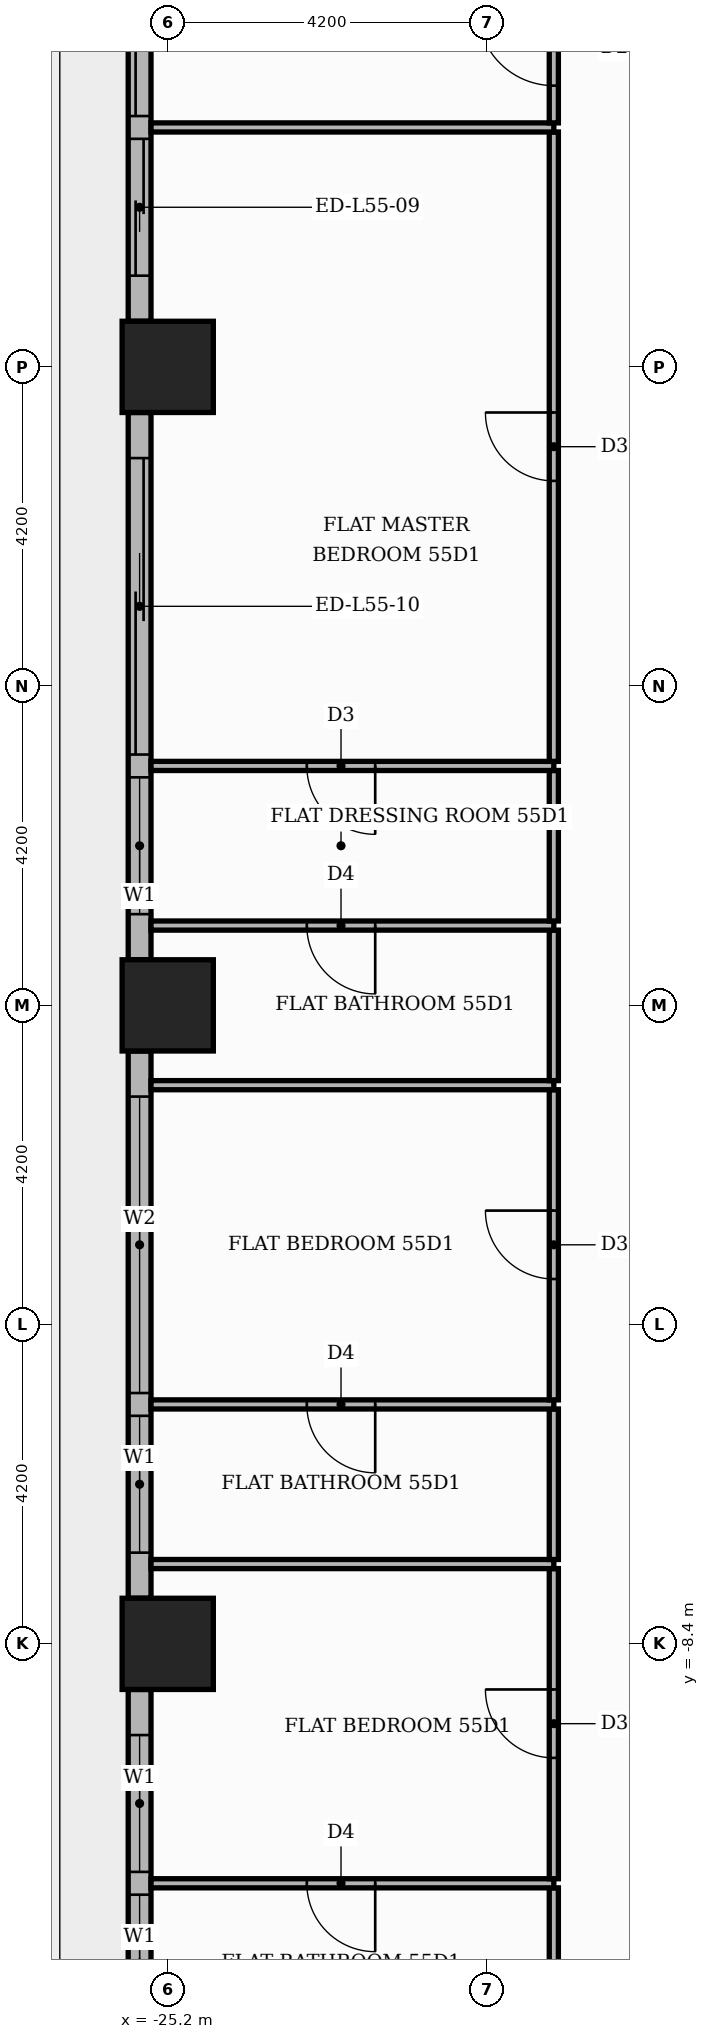
"""IFC4 building model, lengths in metres.
Left out: names, types, materials, properties, quantities, classifications, styles, units other than length and angle.
Written with IfcOpenShell. Run it as: python <this file> out.ifc"""

import sys

from ifc_helpers import new_model, si_unit, direction, frame, frame_2d, origin, origin_2d, place, context, subcontext, project, spatial, rectangle, extrude, element, fill, save


model = new_model("IFC4")
c1 = context("Model", 3, precision=1e-05, world=origin(), true_north=direction((0.0, 1.0)))
c2 = subcontext(c1, "Body", "Model", "MODEL_VIEW")
j1 = project(units=[si_unit("LENGTHUNIT", "METRE"), si_unit("PLANEANGLEUNIT", "RADIAN")], contexts=[c1])
p1 = place(None, origin())
s1 = spatial("IfcSite", under=j1, at=p1, CompositionType="ELEMENT")
p2 = place(p1, origin())
s2 = spatial("IfcBuilding", under=s1, at=p2, CompositionType="ELEMENT")
p3 = place(p2, frame((0.0, 0.0, 231.3)))
s3 = spatial("IfcBuildingStorey", under=s2, at=p3, CompositionType="ELEMENT", Elevation=231.3)
for number, where, z_axis, x_axis in (
    (1, (-25.2, 0.0, 0.0), (0.0, 0.0, 1.0), (1.0, 0.0, 0.0)),
    (2, (-25.2, -8.4, 0.0), (0.0, 0.0, 1.0), (1.0, 0.0, 0.0)),
    (3, (-25.2, 8.4, 0.0), (0.0, 0.0, 1.0), (1.0, 0.0, 0.0)),
):
    element("IfcColumn", number, at=place(p3, frame(where, z_axis=z_axis, x_axis=x_axis)), inside=s3, PredefinedType="COLUMN", context=c2, shape_type="SweptSolid", body=[
        extrude(rectangle(XDim=1.2, YDim=1.2, at=origin_2d()), origin(), (0.0, 0.0, 1.0), 3.9),
    ])
p4 = place(p3, frame((-25.57, 16.2, 0.0), z_axis=(0.0, 0.0, 1.0), x_axis=(0.0, -1.0, 0.0)))
e4 = element("IfcWall", 4, at=p4, inside=s3, PredefinedType="STANDARD", context=c2, shape_type="SweptSolid", body=[
    extrude(rectangle(XDim=7.2, YDim=0.3, at=frame_2d((3.6, 0.0))), origin(), (0.0, 0.0, 1.0), 3.4),
])
p5 = place(p4, frame((0.6, 0.0, 0.0)))
e5 = element("IfcOpeningElement", 5, at=p5, cuts=e4, PredefinedType="OPENING", context=c2, shape_type="SweptSolid", body=[
    extrude(rectangle(XDim=3.9, YDim=2.4, at=frame_2d((1.95, 1.2))), frame((0.0, 0.16, 0.0), z_axis=(0.0, -1.0, 0.0), x_axis=(1.0, 0.0, 0.0)), (0.0, 0.0, 1.0), 0.32),
])
p6 = place(p4, frame((4.8, 0.0, 0.0)))
e6 = element("IfcOpeningElement", 6, at=p6, cuts=e4, PredefinedType="OPENING", context=c2, shape_type="SweptSolid", body=[
    extrude(rectangle(XDim=1.8, YDim=2.4, at=frame_2d((0.9, 1.2))), frame((0.0, 0.16, 0.0), z_axis=(0.0, -1.0, 0.0), x_axis=(1.0, 0.0, 0.0)), (0.0, 0.0, 1.0), 0.32),
])
p7 = place(p3, frame((-25.57, 7.8, 0.0), z_axis=(0.0, 0.0, 1.0), x_axis=(0.0, -1.0, 0.0)))
e7 = element("IfcWall", 7, at=p7, inside=s3, PredefinedType="STANDARD", context=c2, shape_type="SweptSolid", body=[
    extrude(rectangle(XDim=7.2, YDim=0.3, at=frame_2d((3.6, 0.0))), origin(), (0.0, 0.0, 1.0), 3.4),
])
p8 = place(p7, frame((0.6, 0.0, 0.0)))
e8 = element("IfcOpeningElement", 8, at=p8, cuts=e7, PredefinedType="OPENING", context=c2, shape_type="SweptSolid", body=[
    extrude(rectangle(XDim=3.9, YDim=2.4, at=frame_2d((1.95, 1.2))), frame((0.0, 0.16, 0.0), z_axis=(0.0, -1.0, 0.0), x_axis=(1.0, 0.0, 0.0)), (0.0, 0.0, 1.0), 0.32),
])
p9 = place(p7, frame((4.8, 0.0, 0.9)))
e9 = element("IfcOpeningElement", 9, at=p9, cuts=e7, PredefinedType="OPENING", context=c2, shape_type="SweptSolid", body=[
    extrude(rectangle(XDim=1.8, YDim=2.1, at=frame_2d((0.9, 1.05))), frame((0.0, 0.16, 0.0), z_axis=(0.0, -1.0, 0.0), x_axis=(1.0, 0.0, 0.0)), (0.0, 0.0, 1.0), 0.32),
])
p10 = place(p3, frame((-25.57, -0.6, 0.0), z_axis=(0.0, 0.0, 1.0), x_axis=(0.0, -1.0, 0.0)))
e10 = element("IfcWall", 10, at=p10, inside=s3, PredefinedType="STANDARD", context=c2, shape_type="SweptSolid", body=[
    extrude(rectangle(XDim=7.2, YDim=0.3, at=frame_2d((3.6, 0.0))), origin(), (0.0, 0.0, 1.0), 3.4),
])
p11 = place(p10, frame((0.6, 0.0, 0.9)))
e11 = element("IfcOpeningElement", 11, at=p11, cuts=e10, PredefinedType="OPENING", context=c2, shape_type="SweptSolid", body=[
    extrude(rectangle(XDim=3.9, YDim=2.1, at=frame_2d((1.95, 1.05))), frame((0.0, 0.16, 0.0), z_axis=(0.0, -1.0, 0.0), x_axis=(1.0, 0.0, 0.0)), (0.0, 0.0, 1.0), 0.32),
])
p12 = place(p10, frame((4.8, 0.0, 0.9)))
e12 = element("IfcOpeningElement", 12, at=p12, cuts=e10, PredefinedType="OPENING", context=c2, shape_type="SweptSolid", body=[
    extrude(rectangle(XDim=1.8, YDim=2.1, at=frame_2d((0.9, 1.05))), frame((0.0, 0.16, 0.0), z_axis=(0.0, -1.0, 0.0), x_axis=(1.0, 0.0, 0.0)), (0.0, 0.0, 1.0), 0.32),
])
p13 = place(p3, frame((-25.57, -9.0, 0.0), z_axis=(0.0, 0.0, 1.0), x_axis=(0.0, -1.0, 0.0)))
e13 = element("IfcWall", 13, at=p13, inside=s3, PredefinedType="STANDARD", context=c2, shape_type="SweptSolid", body=[
    extrude(rectangle(XDim=7.2, YDim=0.3, at=frame_2d((3.6, 0.0))), origin(), (0.0, 0.0, 1.0), 3.4),
])
p14 = place(p13, frame((0.6, 0.0, 0.9)))
e14 = element("IfcOpeningElement", 14, at=p14, cuts=e13, PredefinedType="OPENING", context=c2, shape_type="SweptSolid", body=[
    extrude(rectangle(XDim=1.8, YDim=2.1, at=frame_2d((0.9, 1.05))), frame((0.0, 0.16, 0.0), z_axis=(0.0, -1.0, 0.0), x_axis=(1.0, 0.0, 0.0)), (0.0, 0.0, 1.0), 0.32),
])
p15 = place(p13, frame((2.7, 0.0, 0.9)))
e15 = element("IfcOpeningElement", 15, at=p15, cuts=e13, PredefinedType="OPENING", context=c2, shape_type="SweptSolid", body=[
    extrude(rectangle(XDim=1.8, YDim=2.1, at=frame_2d((0.9, 1.05))), frame((0.0, 0.16, 0.0), z_axis=(0.0, -1.0, 0.0), x_axis=(1.0, 0.0, 0.0)), (0.0, 0.0, 1.0), 0.32),
])
p16 = place(p13, frame((4.8, 0.0, 0.9)))
e16 = element("IfcOpeningElement", 16, at=p16, cuts=e13, PredefinedType="OPENING", context=c2, shape_type="SweptSolid", body=[
    extrude(rectangle(XDim=1.8, YDim=2.1, at=frame_2d((0.9, 1.05))), frame((0.0, 0.16, 0.0), z_axis=(0.0, -1.0, 0.0), x_axis=(1.0, 0.0, 0.0)), (0.0, 0.0, 1.0), 0.32),
])
p17 = place(p3, frame((-20.12, -13.55, 0.0), z_axis=(0.0, 0.0, 1.0), x_axis=(0.0, 1.0, 0.0)))
e17 = element("IfcWall", 17, at=p17, inside=s3, PredefinedType="PARTITIONING", context=c2, shape_type="SweptSolid", body=[
    extrude(rectangle(XDim=1.94, YDim=0.12, at=frame_2d((0.97, 0.0))), origin(), (0.0, 0.0, 1.0), 3.4),
])
p18 = place(p3, frame((-25.42, -11.55, 0.0), z_axis=(0.0, 0.0, 1.0), x_axis=(1.0, 0.0, 0.0)))
e18 = element("IfcWall", 18, at=p18, inside=s3, PredefinedType="PARTITIONING", context=c2, shape_type="SweptSolid", body=[
    extrude(rectangle(XDim=5.3, YDim=0.12, at=frame_2d((2.65, 0.0))), origin(), (0.0, 0.0, 1.0), 3.4),
])
p19 = place(p18, frame((2.05, 0.0, 0.0)))
e19 = element("IfcOpeningElement", 19, at=p19, cuts=e18, PredefinedType="OPENING", context=c2, shape_type="SweptSolid", body=[
    extrude(rectangle(XDim=0.9, YDim=2.1, at=frame_2d((0.45, 1.05))), frame((0.0, 0.07, 0.0), z_axis=(0.0, -1.0, 0.0), x_axis=(1.0, 0.0, 0.0)), (0.0, 0.0, 1.0), 0.14),
])
p20 = place(p3, frame((-20.12, -11.49, 0.0), z_axis=(0.0, 0.0, 1.0), x_axis=(0.0, 1.0, 0.0)))
e20 = element("IfcWall", 20, at=p20, inside=s3, PredefinedType="PARTITIONING", context=c2, shape_type="SweptSolid", body=[
    extrude(rectangle(XDim=4.08, YDim=0.12, at=frame_2d((2.04, 0.0))), origin(), (0.0, 0.0, 1.0), 3.4),
])
p21 = place(p20, frame((1.59, 0.0, 0.0)))
e21 = element("IfcOpeningElement", 21, at=p21, cuts=e20, PredefinedType="OPENING", context=c2, shape_type="SweptSolid", body=[
    extrude(rectangle(XDim=0.9, YDim=2.1, at=frame_2d((0.45, 1.05))), frame((0.0, 0.07, 0.0), z_axis=(0.0, -1.0, 0.0), x_axis=(1.0, 0.0, 0.0)), (0.0, 0.0, 1.0), 0.14),
])
p22 = place(p3, frame((-25.42, -7.35, 0.0), z_axis=(0.0, 0.0, 1.0), x_axis=(1.0, 0.0, 0.0)))
e22 = element("IfcWall", 22, at=p22, inside=s3, PredefinedType="PARTITIONING", context=c2, shape_type="SweptSolid", body=[
    extrude(rectangle(XDim=5.3, YDim=0.12, at=frame_2d((2.65, 0.0))), origin(), (0.0, 0.0, 1.0), 3.4),
])
p23 = place(p3, frame((-20.12, -7.29, 0.0), z_axis=(0.0, 0.0, 1.0), x_axis=(0.0, 1.0, 0.0)))
e23 = element("IfcWall", 23, at=p23, inside=s3, PredefinedType="PARTITIONING", context=c2, shape_type="SweptSolid", body=[
    extrude(rectangle(XDim=1.98, YDim=0.12, at=frame_2d((0.99, 0.0))), origin(), (0.0, 0.0, 1.0), 3.4),
])
p24 = place(p3, frame((-25.42, -5.25, 0.0), z_axis=(0.0, 0.0, 1.0), x_axis=(1.0, 0.0, 0.0)))
e24 = element("IfcWall", 24, at=p24, inside=s3, PredefinedType="PARTITIONING", context=c2, shape_type="SweptSolid", body=[
    extrude(rectangle(XDim=5.3, YDim=0.12, at=frame_2d((2.65, 0.0))), origin(), (0.0, 0.0, 1.0), 3.4),
])
p25 = place(p24, frame((2.05, 0.0, 0.0)))
e25 = element("IfcOpeningElement", 25, at=p25, cuts=e24, PredefinedType="OPENING", context=c2, shape_type="SweptSolid", body=[
    extrude(rectangle(XDim=0.9, YDim=2.1, at=frame_2d((0.45, 1.05))), frame((0.0, 0.07, 0.0), z_axis=(0.0, -1.0, 0.0), x_axis=(1.0, 0.0, 0.0)), (0.0, 0.0, 1.0), 0.14),
])
p26 = place(p3, frame((-20.12, -5.19, 0.0), z_axis=(0.0, 0.0, 1.0), x_axis=(0.0, 1.0, 0.0)))
e26 = element("IfcWall", 26, at=p26, inside=s3, PredefinedType="PARTITIONING", context=c2, shape_type="SweptSolid", body=[
    extrude(rectangle(XDim=4.08, YDim=0.12, at=frame_2d((2.04, 0.0))), origin(), (0.0, 0.0, 1.0), 3.4),
])
p27 = place(p26, frame((1.59, 0.0, 0.0)))
e27 = element("IfcOpeningElement", 27, at=p27, cuts=e26, PredefinedType="OPENING", context=c2, shape_type="SweptSolid", body=[
    extrude(rectangle(XDim=0.9, YDim=2.1, at=frame_2d((0.45, 1.05))), frame((0.0, 0.07, 0.0), z_axis=(0.0, -1.0, 0.0), x_axis=(1.0, 0.0, 0.0)), (0.0, 0.0, 1.0), 0.14),
])
p28 = place(p3, frame((-25.42, -1.05, 0.0), z_axis=(0.0, 0.0, 1.0), x_axis=(1.0, 0.0, 0.0)))
e28 = element("IfcWall", 28, at=p28, inside=s3, PredefinedType="PARTITIONING", context=c2, shape_type="SweptSolid", body=[
    extrude(rectangle(XDim=5.3, YDim=0.12, at=frame_2d((2.65, 0.0))), origin(), (0.0, 0.0, 1.0), 3.4),
])
p29 = place(p3, frame((-20.12, -0.99, 0.0), z_axis=(0.0, 0.0, 1.0), x_axis=(0.0, 1.0, 0.0)))
e29 = element("IfcWall", 29, at=p29, inside=s3, PredefinedType="PARTITIONING", context=c2, shape_type="SweptSolid", body=[
    extrude(rectangle(XDim=1.98, YDim=0.12, at=frame_2d((0.99, 0.0))), origin(), (0.0, 0.0, 1.0), 3.4),
])
p30 = place(p3, frame((-25.42, 1.05, 0.0), z_axis=(0.0, 0.0, 1.0), x_axis=(1.0, 0.0, 0.0)))
e30 = element("IfcWall", 30, at=p30, inside=s3, PredefinedType="PARTITIONING", context=c2, shape_type="SweptSolid", body=[
    extrude(rectangle(XDim=5.3, YDim=0.12, at=frame_2d((2.65, 0.0))), origin(), (0.0, 0.0, 1.0), 3.4),
])
p31 = place(p30, frame((2.05, 0.0, 0.0)))
e31 = element("IfcOpeningElement", 31, at=p31, cuts=e30, PredefinedType="OPENING", context=c2, shape_type="SweptSolid", body=[
    extrude(rectangle(XDim=0.9, YDim=2.1, at=frame_2d((0.45, 1.05))), frame((0.0, 0.07, 0.0), z_axis=(0.0, -1.0, 0.0), x_axis=(1.0, 0.0, 0.0)), (0.0, 0.0, 1.0), 0.14),
])
p32 = place(p3, frame((-20.12, 1.11, 0.0), z_axis=(0.0, 0.0, 1.0), x_axis=(0.0, 1.0, 0.0)))
e32 = element("IfcWall", 32, at=p32, inside=s3, PredefinedType="PARTITIONING", context=c2, shape_type="SweptSolid", body=[
    extrude(rectangle(XDim=1.98, YDim=0.12, at=frame_2d((0.99, 0.0))), origin(), (0.0, 0.0, 1.0), 3.4),
])
p33 = place(p3, frame((-25.42, 3.15, 0.0), z_axis=(0.0, 0.0, 1.0), x_axis=(1.0, 0.0, 0.0)))
e33 = element("IfcWall", 33, at=p33, inside=s3, PredefinedType="PARTITIONING", context=c2, shape_type="SweptSolid", body=[
    extrude(rectangle(XDim=5.3, YDim=0.12, at=frame_2d((2.65, 0.0))), origin(), (0.0, 0.0, 1.0), 3.4),
])
p34 = place(p33, frame((2.05, 0.0, 0.0)))
e34 = element("IfcOpeningElement", 34, at=p34, cuts=e33, PredefinedType="OPENING", context=c2, shape_type="SweptSolid", body=[
    extrude(rectangle(XDim=0.9, YDim=2.1, at=frame_2d((0.45, 1.05))), frame((0.0, 0.07, 0.0), z_axis=(0.0, -1.0, 0.0), x_axis=(1.0, 0.0, 0.0)), (0.0, 0.0, 1.0), 0.14),
])
p35 = place(p3, frame((-20.12, 3.21, 0.0), z_axis=(0.0, 0.0, 1.0), x_axis=(0.0, 1.0, 0.0)))
e35 = element("IfcWall", 35, at=p35, inside=s3, PredefinedType="PARTITIONING", context=c2, shape_type="SweptSolid", body=[
    extrude(rectangle(XDim=8.28, YDim=0.12, at=frame_2d((4.14, 0.0))), origin(), (0.0, 0.0, 1.0), 3.4),
])
p36 = place(p35, frame((3.69, 0.0, 0.0)))
e36 = element("IfcOpeningElement", 36, at=p36, cuts=e35, PredefinedType="OPENING", context=c2, shape_type="SweptSolid", body=[
    extrude(rectangle(XDim=0.9, YDim=2.1, at=frame_2d((0.45, 1.05))), frame((0.0, 0.07, 0.0), z_axis=(0.0, -1.0, 0.0), x_axis=(1.0, 0.0, 0.0)), (0.0, 0.0, 1.0), 0.14),
])
p37 = place(p3, frame((-25.42, 11.55, 0.0), z_axis=(0.0, 0.0, 1.0), x_axis=(1.0, 0.0, 0.0)))
e37 = element("IfcWall", 37, at=p37, inside=s3, PredefinedType="PARTITIONING", context=c2, shape_type="SweptSolid", body=[
    extrude(rectangle(XDim=5.3, YDim=0.12, at=frame_2d((2.65, 0.0))), origin(), (0.0, 0.0, 1.0), 3.4),
])
p38 = place(p3, frame((-20.12, 11.61, 0.0), z_axis=(0.0, 0.0, 1.0), x_axis=(0.0, 1.0, 0.0)))
e38 = element("IfcWall", 38, at=p38, inside=s3, PredefinedType="PARTITIONING", context=c2, shape_type="SweptSolid", body=[
    extrude(rectangle(XDim=1.98, YDim=0.12, at=frame_2d((0.99, 0.0))), origin(), (0.0, 0.0, 1.0), 3.4),
])
p39 = place(p38, frame((0.49, 0.0, 0.0)))
e39 = element("IfcOpeningElement", 39, at=p39, cuts=e38, PredefinedType="OPENING", context=c2, shape_type="SweptSolid", body=[
    extrude(rectangle(XDim=1.0, YDim=2.1, at=frame_2d((0.5, 1.05))), frame((0.0, 0.07, 0.0), z_axis=(0.0, -1.0, 0.0), x_axis=(1.0, 0.0, 0.0)), (0.0, 0.0, 1.0), 0.14),
])
p40 = place(p5, origin())
e40 = element("IfcDoor", 40, at=p40, inside=s3, OperationType="SLIDING_TO_LEFT", PredefinedType="DOOR", context=c2, shape_type="SweptSolid", body=[
    extrude(rectangle(XDim=3.9, YDim=2.4, at=frame_2d((1.95, 1.2))), frame((0.0, 0.025, 0.0), z_axis=(0.0, -1.0, 0.0), x_axis=(1.0, 0.0, 0.0)), (0.0, 0.0, 1.0), 0.05),
])
fill(e5, e40)
p41 = place(p6, origin())
e41 = element("IfcDoor", 41, at=p41, inside=s3, OperationType="SLIDING_TO_RIGHT", PredefinedType="DOOR", context=c2, shape_type="SweptSolid", body=[
    extrude(rectangle(XDim=1.8, YDim=2.4, at=frame_2d((0.9, 1.2))), frame((0.0, 0.025, 0.0), z_axis=(0.0, -1.0, 0.0), x_axis=(1.0, 0.0, 0.0)), (0.0, 0.0, 1.0), 0.05),
])
fill(e6, e41)
p42 = place(p8, origin())
e42 = element("IfcDoor", 42, at=p42, inside=s3, OperationType="SLIDING_TO_LEFT", PredefinedType="DOOR", context=c2, shape_type="SweptSolid", body=[
    extrude(rectangle(XDim=3.9, YDim=2.4, at=frame_2d((1.95, 1.2))), frame((0.0, 0.025, 0.0), z_axis=(0.0, -1.0, 0.0), x_axis=(1.0, 0.0, 0.0)), (0.0, 0.0, 1.0), 0.05),
])
fill(e8, e42)
p43 = place(p9, origin())
e43 = element("IfcWindow", 43, at=p43, inside=s3, PartitioningType="SINGLE_PANEL", PredefinedType="WINDOW", context=c2, shape_type="SweptSolid", body=[
    extrude(rectangle(XDim=1.8, YDim=2.1, at=frame_2d((0.9, 1.05))), frame((0.0, 0.03, 0.0), z_axis=(0.0, -1.0, 0.0), x_axis=(1.0, 0.0, 0.0)), (0.0, 0.0, 1.0), 0.06),
])
fill(e9, e43)
p44 = place(p11, origin())
e44 = element("IfcWindow", 44, at=p44, inside=s3, PartitioningType="SINGLE_PANEL", PredefinedType="WINDOW", context=c2, shape_type="SweptSolid", body=[
    extrude(rectangle(XDim=3.9, YDim=2.1, at=frame_2d((1.95, 1.05))), frame((0.0, 0.03, 0.0), z_axis=(0.0, -1.0, 0.0), x_axis=(1.0, 0.0, 0.0)), (0.0, 0.0, 1.0), 0.06),
])
fill(e11, e44)
p45 = place(p12, origin())
e45 = element("IfcWindow", 45, at=p45, inside=s3, PartitioningType="SINGLE_PANEL", PredefinedType="WINDOW", context=c2, shape_type="SweptSolid", body=[
    extrude(rectangle(XDim=1.8, YDim=2.1, at=frame_2d((0.9, 1.05))), frame((0.0, 0.03, 0.0), z_axis=(0.0, -1.0, 0.0), x_axis=(1.0, 0.0, 0.0)), (0.0, 0.0, 1.0), 0.06),
])
fill(e12, e45)
p46 = place(p14, origin())
e46 = element("IfcWindow", 46, at=p46, inside=s3, PartitioningType="SINGLE_PANEL", PredefinedType="WINDOW", context=c2, shape_type="SweptSolid", body=[
    extrude(rectangle(XDim=1.8, YDim=2.1, at=frame_2d((0.9, 1.05))), frame((0.0, 0.03, 0.0), z_axis=(0.0, -1.0, 0.0), x_axis=(1.0, 0.0, 0.0)), (0.0, 0.0, 1.0), 0.06),
])
fill(e14, e46)
p47 = place(p15, origin())
e47 = element("IfcWindow", 47, at=p47, inside=s3, PartitioningType="SINGLE_PANEL", PredefinedType="WINDOW", context=c2, shape_type="SweptSolid", body=[
    extrude(rectangle(XDim=1.8, YDim=2.1, at=frame_2d((0.9, 1.05))), frame((0.0, 0.03, 0.0), z_axis=(0.0, -1.0, 0.0), x_axis=(1.0, 0.0, 0.0)), (0.0, 0.0, 1.0), 0.06),
])
fill(e15, e47)
p48 = place(p39, origin())
e48 = element("IfcDoor", 48, at=p48, inside=s3, OperationType="SINGLE_SWING_RIGHT", PredefinedType="DOOR", context=c2, shape_type="SweptSolid", body=[
    extrude(rectangle(XDim=1.0, YDim=2.1, at=frame_2d((0.5, 1.05))), frame((0.0, 0.025, 0.0), z_axis=(0.0, -1.0, 0.0), x_axis=(1.0, 0.0, 0.0)), (0.0, 0.0, 1.0), 0.05),
])
fill(e39, e48)
p49 = place(p36, origin())
e49 = element("IfcDoor", 49, at=p49, inside=s3, OperationType="SINGLE_SWING_RIGHT", PredefinedType="DOOR", context=c2, shape_type="SweptSolid", body=[
    extrude(rectangle(XDim=0.9, YDim=2.1, at=frame_2d((0.45, 1.05))), frame((0.0, 0.025, 0.0), z_axis=(0.0, -1.0, 0.0), x_axis=(1.0, 0.0, 0.0)), (0.0, 0.0, 1.0), 0.05),
])
fill(e36, e49)
p50 = place(p34, frame((0.9, 0.0, 0.0), z_axis=(0.0, 0.0, 1.0), x_axis=(-1.0, 0.0, 0.0)))
e50 = element("IfcDoor", 50, at=p50, inside=s3, OperationType="SINGLE_SWING_RIGHT", PredefinedType="DOOR", context=c2, shape_type="SweptSolid", body=[
    extrude(rectangle(XDim=0.9, YDim=2.1, at=frame_2d((0.45, 1.05))), frame((0.0, 0.025, 0.0), z_axis=(0.0, -1.0, 0.0), x_axis=(1.0, 0.0, 0.0)), (0.0, 0.0, 1.0), 0.05),
])
fill(e34, e50)
p51 = place(p31, frame((0.9, 0.0, 0.0), z_axis=(0.0, 0.0, 1.0), x_axis=(-1.0, 0.0, 0.0)))
e51 = element("IfcDoor", 51, at=p51, inside=s3, OperationType="SINGLE_SWING_RIGHT", PredefinedType="DOOR", context=c2, shape_type="SweptSolid", body=[
    extrude(rectangle(XDim=0.9, YDim=2.1, at=frame_2d((0.45, 1.05))), frame((0.0, 0.025, 0.0), z_axis=(0.0, -1.0, 0.0), x_axis=(1.0, 0.0, 0.0)), (0.0, 0.0, 1.0), 0.05),
])
fill(e31, e51)
p52 = place(p27, origin())
e52 = element("IfcDoor", 52, at=p52, inside=s3, OperationType="SINGLE_SWING_RIGHT", PredefinedType="DOOR", context=c2, shape_type="SweptSolid", body=[
    extrude(rectangle(XDim=0.9, YDim=2.1, at=frame_2d((0.45, 1.05))), frame((0.0, 0.025, 0.0), z_axis=(0.0, -1.0, 0.0), x_axis=(1.0, 0.0, 0.0)), (0.0, 0.0, 1.0), 0.05),
])
fill(e27, e52)
p53 = place(p25, frame((0.9, 0.0, 0.0), z_axis=(0.0, 0.0, 1.0), x_axis=(-1.0, 0.0, 0.0)))
e53 = element("IfcDoor", 53, at=p53, inside=s3, OperationType="SINGLE_SWING_RIGHT", PredefinedType="DOOR", context=c2, shape_type="SweptSolid", body=[
    extrude(rectangle(XDim=0.9, YDim=2.1, at=frame_2d((0.45, 1.05))), frame((0.0, 0.025, 0.0), z_axis=(0.0, -1.0, 0.0), x_axis=(1.0, 0.0, 0.0)), (0.0, 0.0, 1.0), 0.05),
])
fill(e25, e53)
p54 = place(p21, origin())
e54 = element("IfcDoor", 54, at=p54, inside=s3, OperationType="SINGLE_SWING_RIGHT", PredefinedType="DOOR", context=c2, shape_type="SweptSolid", body=[
    extrude(rectangle(XDim=0.9, YDim=2.1, at=frame_2d((0.45, 1.05))), frame((0.0, 0.025, 0.0), z_axis=(0.0, -1.0, 0.0), x_axis=(1.0, 0.0, 0.0)), (0.0, 0.0, 1.0), 0.05),
])
fill(e21, e54)
p55 = place(p19, frame((0.9, 0.0, 0.0), z_axis=(0.0, 0.0, 1.0), x_axis=(-1.0, 0.0, 0.0)))
e55 = element("IfcDoor", 55, at=p55, inside=s3, OperationType="SINGLE_SWING_RIGHT", PredefinedType="DOOR", context=c2, shape_type="SweptSolid", body=[
    extrude(rectangle(XDim=0.9, YDim=2.1, at=frame_2d((0.45, 1.05))), frame((0.0, 0.025, 0.0), z_axis=(0.0, -1.0, 0.0), x_axis=(1.0, 0.0, 0.0)), (0.0, 0.0, 1.0), 0.05),
])
fill(e19, e55)
save(model, sys.argv[1])
